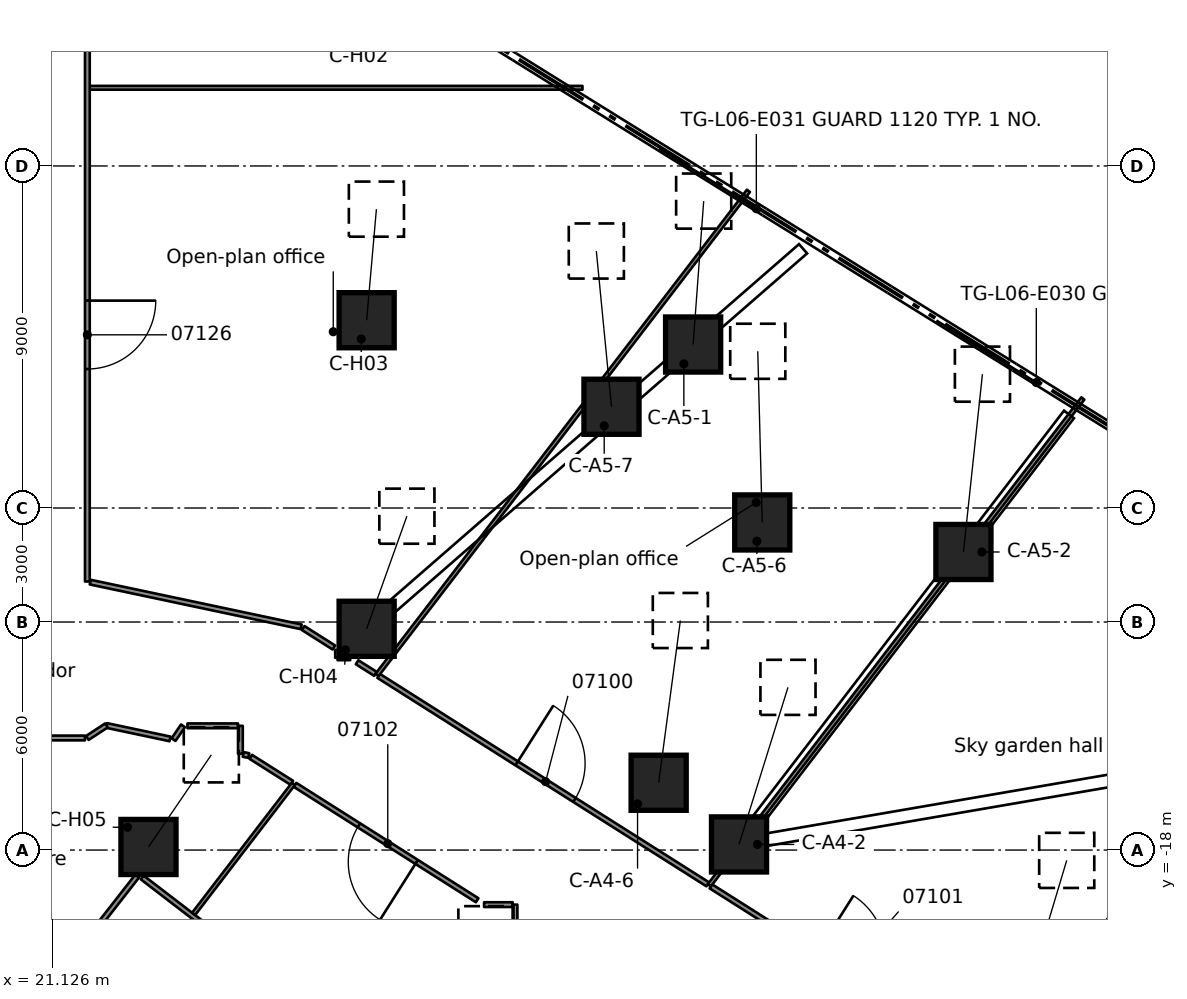
"""IFC4 building model, lengths in metres.
Left out: names, types, materials, properties, quantities, classifications, styles, units other than length and angle.
Written with IfcOpenShell. Run it as: python <this file> out.ifc"""

import sys

from ifc_helpers import new_model, si_unit, direction, frame, frame_2d, origin, origin_2d, place, context, subcontext, project, spatial, rectangle, extrude, element, fill, save


model = new_model("IFC4")
c1 = context("Model", 3, precision=1e-05, world=origin(), true_north=direction((0.0, 1.0)))
c2 = subcontext(c1, "Body", "Model", "MODEL_VIEW")
j1 = project(units=[si_unit("LENGTHUNIT", "METRE"), si_unit("PLANEANGLEUNIT", "RADIAN")], contexts=[c1])
p1 = place(None, origin())
s1 = spatial("IfcSite", under=j1, at=p1, CompositionType="ELEMENT")
p2 = place(p1, origin())
s2 = spatial("IfcBuilding", under=s1, at=p2, CompositionType="ELEMENT")
p3 = place(p2, frame((0.0, 0.0, 33.3)))
s3 = spatial("IfcBuildingStorey", under=s2, at=p3, CompositionType="ELEMENT", Elevation=33.3)
p4 = place(p3, frame((31.179, -23.924, 0.591), z_axis=(0.279657049767, 0.765530427024, 0.579443784862), x_axis=(-0.939287067036, 0.343132344292, 0.0)))
e1 = element("IfcColumn", 1, at=p4, inside=s3, PredefinedType="COLUMN", context=c2, shape_type="SweptSolid", body=[
    extrude(rectangle(XDim=1.45, YDim=1.45, at=origin_2d()), origin(), (0.0, 0.0, 1.0), 4.864),
])
p5 = place(p3, frame((39.199, -17.852, 0.61), z_axis=(0.25036864759, 0.80335307715, 0.540314143566), x_axis=(-0.954709488998, 0.297539563114, 0.0)))
e2 = element("IfcColumn", 2, at=p5, inside=s3, PredefinedType="COLUMN", context=c2, shape_type="SweptSolid", body=[
    extrude(rectangle(XDim=1.45, YDim=1.45, at=origin_2d()), origin(), (0.0, 0.0, 1.0), 5.145),
])
p6 = place(p3, frame((46.313, -23.311, 0.644), z_axis=(0.255000909498, 0.851515737267, 0.458143520463), x_axis=(-0.957966687466, 0.286879461978, 0.0)))
e3 = element("IfcColumn", 3, at=p6, inside=s3, PredefinedType="COLUMN", context=c2, shape_type="SweptSolid", body=[
    extrude(rectangle(XDim=1.45, YDim=1.45, at=origin_2d()), origin(), (0.0, 0.0, 1.0), 5.918),
])
p7 = place(p3, frame((37.084, -16.229, 0.609), z_axis=(0.111371211993, 0.832593849041, 0.54257159498), x_axis=(-0.991171870731, 0.132583266936, 0.0)))
e4 = element("IfcColumn", 4, at=p7, inside=s3, PredefinedType="COLUMN", context=c2, shape_type="SweptSolid", body=[
    extrude(rectangle(XDim=1.45, YDim=1.45, at=origin_2d()), origin(), (0.0, 0.0, 1.0), 5.127),
])
p8 = place(p3, frame((37.991, -4.698, 0.58), z_axis=(0.05877094081, 0.797612996518, 0.600299495503), x_axis=(-0.997296372794, 0.073484316769, 0.0)))
e5 = element("IfcColumn", 5, at=p8, inside=s3, PredefinedType="COLUMN", context=c2, shape_type="SweptSolid", body=[
    extrude(rectangle(XDim=1.45, YDim=1.45, at=origin_2d()), origin(), (0.0, 0.0, 1.0), 4.731),
])
p9 = place(p3, frame((45.104, -10.157, 0.626), z_axis=(0.091757731711, 0.858660609492, 0.50426429219), x_axis=(-0.994338753554, 0.106256497119, 0.0)))
e6 = element("IfcColumn", 6, at=p9, inside=s3, PredefinedType="COLUMN", context=c2, shape_type="SweptSolid", body=[
    extrude(rectangle(XDim=1.45, YDim=1.45, at=origin_2d()), origin(), (0.0, 0.0, 1.0), 5.449),
])
p10 = place(p3, frame((39.81, -9.38, 0.618), z_axis=(-0.022355527015, 0.852096616474, 0.522906862267), x_axis=(-0.999656016178, -0.026226881604, 0.0)))
e7 = element("IfcColumn", 7, at=p10, inside=s3, PredefinedType="COLUMN", context=c2, shape_type="SweptSolid", body=[
    extrude(rectangle(XDim=1.45, YDim=1.45, at=origin_2d()), origin(), (0.0, 0.0, 1.0), 5.286),
])
p11 = place(p3, frame((35.843, -6.336, 0.599), z_axis=(-0.080107774453, 0.822894121297, 0.562519341541), x_axis=(-0.995295018117, -0.096890798904, 0.0)))
e8 = element("IfcColumn", 8, at=p11, inside=s3, PredefinedType="COLUMN", context=c2, shape_type="SweptSolid", body=[
    extrude(rectangle(XDim=1.45, YDim=1.45, at=origin_2d()), origin(), (0.0, 0.0, 1.0), 4.98),
])
p12 = place(p3, frame((29.4, -4.059, 0.508), z_axis=(0.061436713661, 0.698558188668, 0.712910925193), x_axis=(-0.99615487667, 0.08760971228, 0.0)))
e9 = element("IfcColumn", 9, at=p12, inside=s3, PredefinedType="COLUMN", context=c2, shape_type="SweptSolid", body=[
    extrude(rectangle(XDim=1.45, YDim=1.45, at=origin_2d()), origin(), (0.0, 0.0, 1.0), 4.185),
])
p13 = place(p3, frame((29.4, -12.178, 0.53), z_axis=(0.24591316534, 0.687967306264, 0.682808685229), x_axis=(-0.941650592778, 0.33659198018, 0.0)))
e10 = element("IfcColumn", 10, at=p13, inside=s3, PredefinedType="COLUMN", context=c2, shape_type="SweptSolid", body=[
    extrude(rectangle(XDim=1.45, YDim=1.45, at=origin_2d()), origin(), (0.0, 0.0, 1.0), 4.307),
])
p14 = place(p3, frame((23.659, -17.919, 0.508), z_axis=(0.395280825563, 0.579239562537, 0.712905742812), x_axis=(-0.825998448397, 0.563672389997, 0.0)))
e11 = element("IfcColumn", 11, at=p14, inside=s3, PredefinedType="COLUMN", context=c2, shape_type="SweptSolid", body=[
    extrude(rectangle(XDim=1.45, YDim=1.45, at=origin_2d()), origin(), (0.0, 0.0, 1.0), 4.185),
])
p15 = place(p3, frame((25.637, -20.365, 0.0), z_axis=(0.0, 0.0, 1.0), x_axis=(-0.79329611627, 0.608835997548, 0.0)))
e12 = element("IfcWall", 12, at=p15, inside=s3, PredefinedType="PARTITIONING", context=c2, shape_type="SweptSolid", body=[
    extrude(rectangle(XDim=2.699, YDim=0.125, at=frame_2d((1.349, 0.0))), origin(), (0.0, 0.0, 1.0), 3.56),
])
p16 = place(p3, frame((32.308, -19.321, 0.0), z_axis=(0.0, 0.0, 1.0), x_axis=(-0.844784712182, 0.535106335287, 0.0)))
e13 = element("IfcWall", 13, at=p16, inside=s3, PredefinedType="PARTITIONING", context=c2, shape_type="SweptSolid", body=[
    extrude(rectangle(XDim=5.674, YDim=0.125, at=frame_2d((2.837, 0.0))), origin(), (0.0, 0.0, 1.0), 3.56),
])
p17 = place(p16, frame((1.885, 0.0, 0.0)))
e14 = element("IfcOpeningElement", 14, at=p17, cuts=e13, PredefinedType="OPENING", context=c2, shape_type="SweptSolid", body=[
    extrude(rectangle(XDim=1.8, YDim=2.1, at=frame_2d((0.9, 1.05))), frame((0.0, 0.073, 0.0), z_axis=(0.0, -1.0, 0.0), x_axis=(1.0, 0.0, 0.0)), (0.0, 0.0, 1.0), 0.145),
])
p18 = place(p3, frame((29.149, -13.058, 0.0), z_axis=(0.0, 0.0, 1.0), x_axis=(0.844889827786, -0.534940350791, 0.0)))
e15 = element("IfcWall", 15, at=p18, inside=s3, PredefinedType="PARTITIONING", context=c2, shape_type="SweptSolid", body=[
    extrude(rectangle(XDim=0.572, YDim=0.125, at=frame_2d((0.286, 0.0))), origin(), (0.0, 0.0, 1.0), 3.56),
])
p19 = place(p3, frame((38.458, -18.955, 0.0), z_axis=(0.0, 0.0, 1.0), x_axis=(0.84479374754, -0.535092070692, 0.0)))
e16 = element("IfcWall", 16, at=p19, inside=s3, PredefinedType="PARTITIONING", context=c2, shape_type="SweptSolid", body=[
    extrude(rectangle(XDim=8.279, YDim=0.125, at=frame_2d((4.139, 0.0))), origin(), (0.0, 0.0, 1.0), 3.56),
])
p20 = place(p19, frame((3.3, 0.0, 0.0)))
e17 = element("IfcOpeningElement", 17, at=p20, cuts=e16, PredefinedType="OPENING", context=c2, shape_type="SweptSolid", body=[
    extrude(rectangle(XDim=1.8, YDim=2.1, at=frame_2d((0.9, 1.05))), frame((0.0, 0.073, 0.0), z_axis=(0.0, -1.0, 0.0), x_axis=(1.0, 0.0, 0.0)), (0.0, 0.0, 1.0), 0.145),
])
p21 = place(p3, frame((26.351, -15.547, 0.0), z_axis=(0.0, 0.0, 1.0), x_axis=(0.84483922118, -0.535020270976, 0.0)))
e18 = element("IfcWall", 18, at=p21, inside=s3, PredefinedType="PARTITIONING", context=c2, shape_type="SweptSolid", body=[
    extrude(rectangle(XDim=1.278, YDim=0.125, at=frame_2d((0.639, 0.0))), origin(), (0.0, 0.0, 1.0), 3.56),
])
p22 = place(p3, frame((27.731, -12.159, 0.0), z_axis=(0.0, 0.0, 1.0), x_axis=(0.844742160037, -0.535173507431, 0.0)))
e19 = element("IfcWall", 19, at=p22, inside=s3, PredefinedType="PARTITIONING", context=c2, shape_type="SweptSolid", body=[
    extrude(rectangle(XDim=0.957, YDim=0.125, at=frame_2d((0.478, 0.0))), origin(), (0.0, 0.0, 1.0), 3.56),
])
p23 = place(p3, frame((29.716, -13.418, 0.0), z_axis=(0.0, 0.0, 1.0), x_axis=(0.844839535243, -0.535019775047, 0.0)))
e20 = element("IfcWall", 20, at=p23, inside=s3, PredefinedType="PARTITIONING", context=c2, shape_type="SweptSolid", body=[
    extrude(rectangle(XDim=10.248, YDim=0.125, at=frame_2d((5.124, 0.0))), origin(), (0.0, 0.0, 1.0), 3.56),
])
p24 = place(p23, frame((4.3, 0.0, 0.0)))
e21 = element("IfcOpeningElement", 21, at=p24, cuts=e20, PredefinedType="OPENING", context=c2, shape_type="SweptSolid", body=[
    extrude(rectangle(XDim=1.8, YDim=2.1, at=frame_2d((0.9, 1.05))), frame((0.0, 0.073, 0.0), z_axis=(0.0, -1.0, 0.0), x_axis=(1.0, 0.0, 0.0)), (0.0, 0.0, 1.0), 0.145),
])
p25 = place(p3, frame((22.553, -14.721, 0.0), z_axis=(0.0, 0.0, 1.0), x_axis=(0.978249040896, -0.207433878586, 0.0)))
e22 = element("IfcWall", 22, at=p25, inside=s3, PredefinedType="PARTITIONING", context=c2, shape_type="SweptSolid", body=[
    extrude(rectangle(XDim=1.711, YDim=0.125, at=frame_2d((0.855, 0.0))), origin(), (0.0, 0.0, 1.0), 3.56),
])
p26 = place(p3, frame((22.126, -10.95, 0.0), z_axis=(0.0, 0.0, 1.0), x_axis=(0.978293887618, -0.207222270641, 0.0)))
e23 = element("IfcWall", 23, at=p26, inside=s3, PredefinedType="PARTITIONING", context=c2, shape_type="SweptSolid", body=[
    extrude(rectangle(XDim=5.675, YDim=0.125, at=frame_2d((2.838, 0.0))), origin(), (0.0, 0.0, 1.0), 3.56),
])
p27 = place(p3, frame((26.153, -15.484, 0.0), z_axis=(0.0, 0.0, 1.0), x_axis=(0.979226570581, -0.202769138353, 0.0)))
e24 = element("IfcWall", 24, at=p27, inside=s3, PredefinedType="PARTITIONING", context=c2, shape_type="SweptSolid", body=[
    extrude(rectangle(XDim=0.148, YDim=0.125, at=frame_2d((0.074, 0.0))), origin(), (0.0, 0.0, 1.0), 3.56),
])
p28 = place(p3, frame((32.49, -19.436, 0.0), z_axis=(0.0, 0.0, 1.0), x_axis=(1.0, 0.0, 0.0)))
e25 = element("IfcWall", 25, at=p28, inside=s3, PredefinedType="PARTITIONING", context=c2, shape_type="SweptSolid", body=[
    extrude(rectangle(XDim=0.752, YDim=0.125, at=frame_2d((0.376, 0.0))), origin(), (0.0, 0.0, 1.0), 3.56),
])
p29 = place(p3, frame((18.137, -15.051, 0.0), z_axis=(0.0, 0.0, 1.0), x_axis=(1.0, 0.0, 0.0)))
e26 = element("IfcWall", 26, at=p29, inside=s3, PredefinedType="PARTITIONING", context=c2, shape_type="SweptSolid", body=[
    extrude(rectangle(XDim=3.851, YDim=0.125, at=frame_2d((1.926, 0.0))), origin(), (0.0, 0.0, 1.0), 3.56),
])
p30 = place(p3, frame((24.685, -14.731, 0.0), z_axis=(0.0, 0.0, 1.0), x_axis=(1.0, 0.0, 0.0)))
e27 = element("IfcWall", 27, at=p30, inside=s3, PredefinedType="PARTITIONING", context=c2, shape_type="SweptSolid", body=[
    extrude(rectangle(XDim=1.33, YDim=0.125, at=frame_2d((0.665, 0.0))), origin(), (0.0, 0.0, 1.0), 3.56),
])
p31 = place(p3, frame((28.635, -12.942, 0.0), z_axis=(0.0, 0.0, 1.0), x_axis=(1.0, 0.0, 0.0)))
e28 = element("IfcWall", 28, at=p31, inside=s3, PredefinedType="PARTITIONING", context=c2, shape_type="SweptSolid", body=[
    extrude(rectangle(XDim=0.332, YDim=0.125, at=frame_2d((0.166, 0.0))), origin(), (0.0, 0.0, 1.0), 3.56),
])
p32 = place(p3, frame((22.113, 2.057, 0.0), z_axis=(0.0, 0.0, 1.0), x_axis=(1.0, 0.0, 0.0)))
e29 = element("IfcWall", 29, at=p32, inside=s3, PredefinedType="PARTITIONING", context=c2, shape_type="SweptSolid", body=[
    extrude(rectangle(XDim=12.966, YDim=0.1, at=frame_2d((6.483, 0.0))), origin(), (0.0, 0.0, 1.0), 3.56),
])
p33 = place(p3, frame((21.044, -21.651, 0.0), z_axis=(0.0, 0.0, 1.0), x_axis=(0.615694374495, 0.787985048853, 0.0)))
e30 = element("IfcWall", 30, at=p33, inside=s3, PredefinedType="PARTITIONING", context=c2, shape_type="SweptSolid", body=[
    extrude(rectangle(XDim=3.765, YDim=0.125, at=frame_2d((1.883, 0.0))), origin(), (0.0, 0.0, 1.0), 3.56),
])
p34 = place(p3, frame((45.787, -23.942, 0.0), z_axis=(0.0, 0.0, 1.0), x_axis=(0.608772061456, 0.793345181614, 0.0)))
e31 = element("IfcWall", 31, at=p34, inside=s3, PredefinedType="PARTITIONING", context=c2, shape_type="SweptSolid", body=[
    extrude(rectangle(XDim=15.907, YDim=0.1, at=frame_2d((7.954, 0.0))), origin(), (0.0, 0.0, 1.0), 3.56),
])
p35 = place(p3, frame((38.416, -18.928, 0.0), z_axis=(0.0, 0.0, 1.0), x_axis=(0.608783820642, 0.793336158084, 0.0)))
e32 = element("IfcWall", 32, at=p35, inside=s3, PredefinedType="PARTITIONING", context=c2, shape_type="SweptSolid", body=[
    extrude(rectangle(XDim=16.147, YDim=0.1, at=frame_2d((8.073, 0.0))), origin(), (0.0, 0.0, 1.0), 3.56),
])
p36 = place(p3, frame((24.847, -19.68, 0.0), z_axis=(0.0, 0.0, 1.0), x_axis=(0.60880221693, 0.793322040953, 0.0)))
e33 = element("IfcWall", 33, at=p36, inside=s3, PredefinedType="PARTITIONING", context=c2, shape_type="SweptSolid", body=[
    extrude(rectangle(XDim=4.313, YDim=0.1, at=frame_2d((2.157, 0.0))), origin(), (0.0, 0.0, 1.0), 3.56),
])
p37 = place(p3, frame((29.674, -13.391, 0.0), z_axis=(0.0, 0.0, 1.0), x_axis=(0.608731304684, 0.79337645459, 0.0)))
e34 = element("IfcWall", 34, at=p37, inside=s3, PredefinedType="PARTITIONING", context=c2, shape_type="SweptSolid", body=[
    extrude(rectangle(XDim=16.053, YDim=0.1, at=frame_2d((8.026, 0.0))), origin(), (0.0, 0.0, 1.0), 3.56),
])
p38 = place(p3, frame((24.319, -15.095, 0.0), z_axis=(0.0, 0.0, 1.0), x_axis=(0.562734556466, 0.826637658808, 0.0)))
e35 = element("IfcWall", 35, at=p38, inside=s3, PredefinedType="PARTITIONING", context=c2, shape_type="SweptSolid", body=[
    extrude(rectangle(XDim=0.44, YDim=0.125, at=frame_2d((0.22, 0.0))), origin(), (0.0, 0.0, 1.0), 3.56),
])
p39 = place(p3, frame((33.304, -19.952, 0.0), z_axis=(0.0, 0.0, 1.0), x_axis=(0.0, 1.0, 0.0)))
e36 = element("IfcWall", 36, at=p39, inside=s3, PredefinedType="PARTITIONING", context=c2, shape_type="SweptSolid", body=[
    extrude(rectangle(XDim=0.516, YDim=0.125, at=frame_2d((0.258, 0.0))), origin(), (0.0, 0.0, 1.0), 3.56),
])
p40 = place(p3, frame((28.635, -12.942, 0.0), z_axis=(0.0, 0.0, 1.0), x_axis=(0.0, 1.0, 0.0)))
e37 = element("IfcWall", 37, at=p40, inside=s3, PredefinedType="PARTITIONING", context=c2, shape_type="SweptSolid", body=[
    extrude(rectangle(XDim=0.21, YDim=0.125, at=frame_2d((0.105, 0.0))), origin(), (0.0, 0.0, 1.0), 3.56),
])
p41 = place(p3, frame((26.078, -15.468, 0.0), z_axis=(0.0, 0.0, 1.0), x_axis=(0.0, 1.0, 0.0)))
e38 = element("IfcWall", 38, at=p41, inside=s3, PredefinedType="PARTITIONING", context=c2, shape_type="SweptSolid", body=[
    extrude(rectangle(XDim=0.737, YDim=0.125, at=frame_2d((0.369, 0.0))), origin(), (0.0, 0.0, 1.0), 3.56),
])
p42 = place(p3, frame((22.051, -15.05, 0.0), z_axis=(0.0, 0.0, 1.0), x_axis=(0.836281057999, 0.548301004953, 0.0)))
e39 = element("IfcWall", 39, at=p42, inside=s3, PredefinedType="PARTITIONING", context=c2, shape_type="SweptSolid", body=[
    extrude(rectangle(XDim=0.6, YDim=0.125, at=frame_2d((0.3, 0.0))), origin(), (0.0, 0.0, 1.0), 3.56),
])
p43 = place(p3, frame((22.051, 15.05, 0.0), z_axis=(0.0, 0.0, 1.0), x_axis=(0.0, -1.0, 0.0)))
e40 = element("IfcWall", 40, at=p43, inside=s3, PredefinedType="PARTITIONING", context=c2, shape_type="SweptSolid", body=[
    extrude(rectangle(XDim=25.984, YDim=0.125, at=frame_2d((12.992, 0.0))), origin(), (0.0, 0.0, 1.0), 3.56),
])
p44 = place(p43, frame((18.593, 0.0, 0.0)))
e41 = element("IfcOpeningElement", 41, at=p44, cuts=e40, PredefinedType="OPENING", context=c2, shape_type="SweptSolid", body=[
    extrude(rectangle(XDim=1.8, YDim=2.1, at=frame_2d((0.9, 1.05))), frame((0.0, 0.073, 0.0), z_axis=(0.0, -1.0, 0.0), x_axis=(1.0, 0.0, 0.0)), (0.0, 0.0, 1.0), 0.145),
])
p45 = place(p43, frame((5.6, 0.0, 0.0)))
e42 = element("IfcOpeningElement", 42, at=p45, cuts=e40, PredefinedType="OPENING", context=c2, shape_type="SweptSolid", body=[
    extrude(rectangle(XDim=1.8, YDim=2.1, at=frame_2d((0.9, 1.05))), frame((0.0, 0.073, 0.0), z_axis=(0.0, -1.0, 0.0), x_axis=(1.0, 0.0, 0.0)), (0.0, 0.0, 1.0), 0.145),
])
p46 = place(p24, origin())
e43 = element("IfcDoor", 43, at=p46, inside=s3, OperationType="DOUBLE_DOOR_SINGLE_SWING", PredefinedType="DOOR", context=c2, shape_type="SweptSolid", body=[
    extrude(rectangle(XDim=1.8, YDim=2.1, at=frame_2d((0.9, 1.05))), frame((0.0, 0.025, 0.0), z_axis=(0.0, -1.0, 0.0), x_axis=(1.0, 0.0, 0.0)), (0.0, 0.0, 1.0), 0.05),
])
fill(e21, e43)
p47 = place(p17, origin())
e44 = element("IfcDoor", 44, at=p47, inside=s3, OperationType="DOUBLE_DOOR_SINGLE_SWING", PredefinedType="DOOR", context=c2, shape_type="SweptSolid", body=[
    extrude(rectangle(XDim=1.8, YDim=2.1, at=frame_2d((0.9, 1.05))), frame((0.0, 0.025, 0.0), z_axis=(0.0, -1.0, 0.0), x_axis=(1.0, 0.0, 0.0)), (0.0, 0.0, 1.0), 0.05),
])
fill(e14, e44)
p48 = place(p44, origin())
e45 = element("IfcDoor", 45, at=p48, inside=s3, OperationType="DOUBLE_DOOR_SINGLE_SWING", PredefinedType="DOOR", context=c2, shape_type="SweptSolid", body=[
    extrude(rectangle(XDim=1.8, YDim=2.1, at=frame_2d((0.9, 1.05))), frame((0.0, 0.025, 0.0), z_axis=(0.0, -1.0, 0.0), x_axis=(1.0, 0.0, 0.0)), (0.0, 0.0, 1.0), 0.05),
])
fill(e41, e45)
save(model, sys.argv[1])
